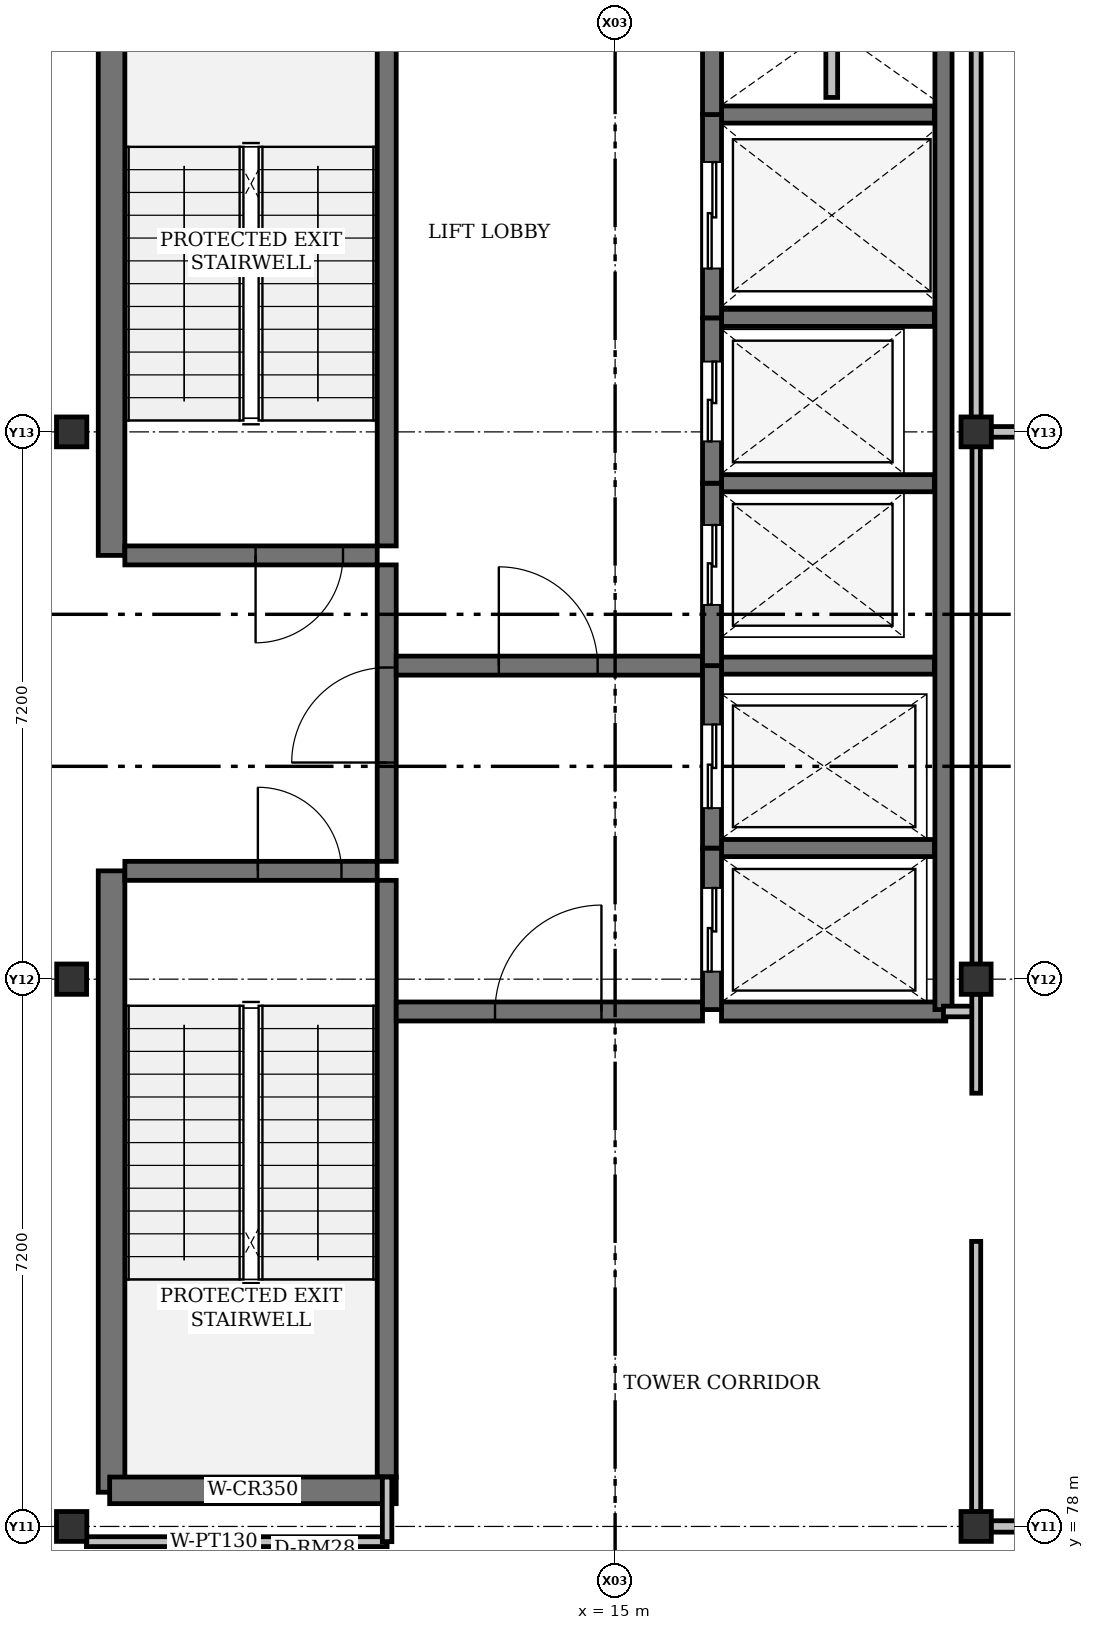
"""IFC4 building model, lengths in metres.
Left out: names, types, materials, properties, quantities, classifications, styles, units other than length and angle.
Written with IfcOpenShell. Run it as: python <this file> out.ifc"""

import sys

from ifc_helpers import new_model, si_unit, direction, frame, frame_2d, origin, origin_2d, place, context, subcontext, project, spatial, rectangle, i_section, extrude, element, fill, save


model = new_model("IFC4")
c1 = context("Model", 3, precision=1e-05, world=origin(), true_north=direction((0.0, 1.0)))
c2 = subcontext(c1, "Body", "Model", "MODEL_VIEW")
j1 = project(units=[si_unit("LENGTHUNIT", "METRE"), si_unit("PLANEANGLEUNIT", "RADIAN")], contexts=[c1])
p1 = place(None, origin())
s1 = spatial("IfcSite", under=j1, at=p1, CompositionType="ELEMENT")
p2 = place(p1, origin())
s2 = spatial("IfcBuilding", under=s1, at=p2, CompositionType="ELEMENT")
p3 = place(p2, frame((0.0, 0.0, 5.4)))
s3 = spatial("IfcBuildingStorey", under=s2, at=p3, CompositionType="ELEMENT", Elevation=5.4)
for number, where, z_axis, x_axis in (
    (1, (7.85, 78.0, 0.0), (0.0, 0.0, 1.0), (1.0, 0.0, 0.0)),
    (2, (19.75, 78.0, 0.0), (0.0, 0.0, 1.0), (1.0, 0.0, 0.0)),
    (3, (7.85, 85.2, 0.0), (0.0, 0.0, 1.0), (0.0, 1.0, 0.0)),
    (4, (19.75, 85.2, 0.0), (0.0, 0.0, 1.0), (0.0, 1.0, 0.0)),
    (5, (7.85, 92.4, 0.0), (0.0, 0.0, 1.0), (1.0, 0.0, 0.0)),
    (6, (19.75, 92.4, 0.0), (0.0, 0.0, 1.0), (1.0, 0.0, 0.0)),
):
    element("IfcColumn", number, at=place(p3, frame(where, z_axis=z_axis, x_axis=x_axis)), inside=s3, PredefinedType="COLUMN", context=c2, shape_type="SweptSolid", body=[
        extrude(i_section(OverallWidth=0.399, OverallDepth=0.393, WebThickness=0.023, FlangeThickness=0.036, FilletRadius=0.015, at=origin_2d()), origin(), (0.0, 0.0, 1.0), 4.5),
    ])
for number, where, z_axis, x_axis in (
    (7, (8.375, 78.45, 0.0), (0.0, 0.0, 1.0), (0.0, 1.0, 0.0)),
    (8, (8.375, 90.775, 0.0), (0.0, 0.0, 1.0), (0.0, 1.0, 0.0)),
):
    element("IfcWall", number, at=place(p3, frame(where, z_axis=z_axis, x_axis=x_axis)), inside=s3, PredefinedType="SHEAR", context=c2, shape_type="SweptSolid", body=[
        extrude(rectangle(XDim=8.175, YDim=0.35, at=frame_2d((4.087, 0.0))), origin(), (0.0, 0.0, 1.0), 4.5),
    ])
for number, where, z_axis, x_axis in (
    (9, (11.995, 78.65, 0.0), (0.0, 0.0, 1.0), (0.0, 1.0, 0.0)),
    (10, (11.995, 90.9, 0.0), (0.0, 0.0, 1.0), (0.0, 1.0, 0.0)),
):
    element("IfcWall", number, at=place(p3, frame(where, z_axis=z_axis, x_axis=x_axis)), inside=s3, PredefinedType="SHEAR", context=c2, shape_type="SweptSolid", body=[
        extrude(rectangle(XDim=7.85, YDim=0.25, at=frame_2d((3.925, 0.0))), origin(), (0.0, 0.0, 1.0), 4.5),
    ])
p4 = place(p3, frame((11.995, 86.75, 0.0), z_axis=(0.0, 0.0, 1.0), x_axis=(0.0, 1.0, 0.0)))
e11 = element("IfcWall", 11, at=p4, inside=s3, PredefinedType="SHEAR", context=c2, shape_type="SweptSolid", body=[
    extrude(rectangle(XDim=3.9, YDim=0.25, at=frame_2d((1.95, 0.0))), origin(), (0.0, 0.0, 1.0), 4.5),
])
p5 = place(p4, frame((1.3, 0.0, 0.0)))
e12 = element("IfcOpeningElement", 12, at=p5, cuts=e11, PredefinedType="OPENING", context=c2, shape_type="SweptSolid", body=[
    extrude(rectangle(XDim=1.25, YDim=2.2, at=frame_2d((0.625, 1.1))), frame((0.0, 0.125, 0.0), z_axis=(0.0, -1.0, 0.0), x_axis=(1.0, 0.0, 0.0)), (0.0, 0.0, 1.0), 0.25),
])
p6 = place(p3, frame((8.35, 78.475, 0.0), z_axis=(0.0, 0.0, 1.0), x_axis=(1.0, 0.0, 0.0)))
e13 = element("IfcWall", 13, at=p6, inside=s3, PredefinedType="SHEAR", context=c2, shape_type="SweptSolid", body=[
    extrude(rectangle(XDim=3.77, YDim=0.35, at=frame_2d((1.885, 0.0))), origin(), (0.0, 0.0, 1.0), 4.5),
])
p7 = place(p3, frame((8.55, 86.625, 0.0), z_axis=(0.0, 0.0, 1.0), x_axis=(1.0, 0.0, 0.0)))
e14 = element("IfcWall", 14, at=p7, inside=s3, PredefinedType="SHEAR", context=c2, shape_type="SweptSolid", body=[
    extrude(rectangle(XDim=3.32, YDim=0.25, at=frame_2d((1.66, 0.0))), origin(), (0.0, 0.0, 1.0), 4.5),
])
p8 = place(p7, frame((1.75, 0.0, 0.0)))
e15 = element("IfcOpeningElement", 15, at=p8, cuts=e14, PredefinedType="OPENING", context=c2, shape_type="SweptSolid", body=[
    extrude(rectangle(XDim=1.1, YDim=2.15, at=frame_2d((0.55, 1.075))), frame((0.0, 0.125, 0.0), z_axis=(0.0, -1.0, 0.0), x_axis=(1.0, 0.0, 0.0)), (0.0, 0.0, 1.0), 0.25),
])
p9 = place(p3, frame((11.87, 90.775, 0.0), z_axis=(0.0, 0.0, 1.0), x_axis=(-1.0, 0.0, 0.0)))
e16 = element("IfcWall", 16, at=p9, inside=s3, PredefinedType="SHEAR", context=c2, shape_type="SweptSolid", body=[
    extrude(rectangle(XDim=3.32, YDim=0.25, at=frame_2d((1.66, 0.0))), origin(), (0.0, 0.0, 1.0), 4.5),
])
p10 = place(p9, frame((0.45, 0.0, 0.0)))
e17 = element("IfcOpeningElement", 17, at=p10, cuts=e16, PredefinedType="OPENING", context=c2, shape_type="SweptSolid", body=[
    extrude(rectangle(XDim=1.15, YDim=2.15, at=frame_2d((0.575, 1.075))), frame((0.0, 0.125, 0.0), z_axis=(0.0, -1.0, 0.0), x_axis=(1.0, 0.0, 0.0)), (0.0, 0.0, 1.0), 0.25),
])
p11 = place(p3, frame((12.12, 89.325, 0.0), z_axis=(0.0, 0.0, 1.0), x_axis=(1.0, 0.0, 0.0)))
e18 = element("IfcWall", 18, at=p11, inside=s3, PredefinedType="SHEAR", context=c2, shape_type="SweptSolid", body=[
    extrude(rectangle(XDim=4.03, YDim=0.25, at=frame_2d((2.015, 0.0))), origin(), (0.0, 0.0, 1.0), 4.5),
])
p12 = place(p11, frame((1.35, 0.0, 0.0)))
e19 = element("IfcOpeningElement", 19, at=p12, cuts=e18, PredefinedType="OPENING", context=c2, shape_type="SweptSolid", body=[
    extrude(rectangle(XDim=1.3, YDim=2.2, at=frame_2d((0.65, 1.1))), frame((0.0, 0.125, 0.0), z_axis=(0.0, -1.0, 0.0), x_axis=(1.0, 0.0, 0.0)), (0.0, 0.0, 1.0), 0.25),
])
p13 = place(p3, frame((12.12, 84.775, 0.0), z_axis=(0.0, 0.0, 1.0), x_axis=(1.0, 0.0, 0.0)))
e20 = element("IfcWall", 20, at=p13, inside=s3, PredefinedType="SHEAR", context=c2, shape_type="SweptSolid", body=[
    extrude(rectangle(XDim=4.03, YDim=0.25, at=frame_2d((2.015, 0.0))), origin(), (0.0, 0.0, 1.0), 4.5),
])
p14 = place(p13, frame((1.3, 0.0, 0.0)))
e21 = element("IfcOpeningElement", 21, at=p14, cuts=e20, PredefinedType="OPENING", context=c2, shape_type="SweptSolid", body=[
    extrude(rectangle(XDim=1.4, YDim=2.25, at=frame_2d((0.7, 1.125))), frame((0.0, 0.125, 0.0), z_axis=(0.0, -1.0, 0.0), x_axis=(1.0, 0.0, 0.0)), (0.0, 0.0, 1.0), 0.25),
])
p15 = place(p3, frame((16.4, 84.775, 0.0), z_axis=(0.0, 0.0, 1.0), x_axis=(1.0, 0.0, 0.0)))
e22 = element("IfcWall", 22, at=p15, inside=s3, PredefinedType="SHEAR", context=c2, shape_type="SweptSolid", body=[
    extrude(rectangle(XDim=2.95, YDim=0.25, at=frame_2d((1.475, 0.0))), origin(), (0.0, 0.0, 1.0), 4.5),
])
p16 = place(p3, frame((19.32, 84.8, 0.0), z_axis=(0.0, 0.0, 1.0), x_axis=(0.0, 1.0, 0.0)))
e23 = element("IfcWall", 23, at=p16, inside=s3, PredefinedType="SHEAR", context=c2, shape_type="SweptSolid", body=[
    extrude(rectangle(XDim=13.95, YDim=0.225, at=frame_2d((6.975, 0.0))), origin(), (0.0, 0.0, 1.0), 4.5),
])
for number, where, z_axis, x_axis in (
    (24, (16.4, 86.925, 0.0), (0.0, 0.0, 1.0), (1.0, 0.0, 0.0)),
    (25, (16.4, 89.325, 0.0), (0.0, 0.0, 1.0), (1.0, 0.0, 0.0)),
    (26, (16.4, 91.725, 0.0), (0.0, 0.0, 1.0), (1.0, 0.0, 0.0)),
    (27, (16.4, 93.9, 0.0), (0.0, 0.0, 1.0), (1.0, 0.0, 0.0)),
    (28, (16.4, 96.575, 0.0), (0.0, 0.0, 1.0), (1.0, 0.0, 0.0)),
):
    element("IfcWall", number, at=place(p3, frame(where, z_axis=z_axis, x_axis=x_axis)), inside=s3, PredefinedType="SHEAR", context=c2, shape_type="SweptSolid", body=[
        extrude(rectangle(XDim=2.8, YDim=0.225, at=frame_2d((1.4, 0.0))), origin(), (0.0, 0.0, 1.0), 4.5),
    ])
p17 = place(p3, frame((16.275, 84.8, 0.0), z_axis=(0.0, 0.0, 1.0), x_axis=(0.0, 1.0, 0.0)))
e29 = element("IfcWall", 29, at=p17, inside=s3, PredefinedType="SHEAR", context=c2, shape_type="SweptSolid", body=[
    extrude(rectangle(XDim=2.125, YDim=0.25, at=frame_2d((1.062, 0.0))), origin(), (0.0, 0.0, 1.0), 4.5),
])
p18 = place(p17, frame((0.5, 0.0, 0.0)))
e30 = element("IfcOpeningElement", 30, at=p18, cuts=e29, PredefinedType="OPENING", context=c2, shape_type="SweptSolid", body=[
    extrude(rectangle(XDim=1.1, YDim=2.15, at=frame_2d((0.55, 1.075))), frame((0.0, 0.125, 0.0), z_axis=(0.0, -1.0, 0.0), x_axis=(1.0, 0.0, 0.0)), (0.0, 0.0, 1.0), 0.25),
])
p19 = place(p3, frame((16.275, 86.925, 0.0), z_axis=(0.0, 0.0, 1.0), x_axis=(0.0, 1.0, 0.0)))
e31 = element("IfcWall", 31, at=p19, inside=s3, PredefinedType="SHEAR", context=c2, shape_type="SweptSolid", body=[
    extrude(rectangle(XDim=2.4, YDim=0.25, at=frame_2d((1.2, 0.0))), origin(), (0.0, 0.0, 1.0), 4.5),
])
p20 = place(p19, frame((0.525, 0.0, 0.0)))
e32 = element("IfcOpeningElement", 32, at=p20, cuts=e31, PredefinedType="OPENING", context=c2, shape_type="SweptSolid", body=[
    extrude(rectangle(XDim=1.1, YDim=2.15, at=frame_2d((0.55, 1.075))), frame((0.0, 0.125, 0.0), z_axis=(0.0, -1.0, 0.0), x_axis=(1.0, 0.0, 0.0)), (0.0, 0.0, 1.0), 0.25),
])
p21 = place(p3, frame((16.275, 89.325, 0.0), z_axis=(0.0, 0.0, 1.0), x_axis=(0.0, 1.0, 0.0)))
e33 = element("IfcWall", 33, at=p21, inside=s3, PredefinedType="SHEAR", context=c2, shape_type="SweptSolid", body=[
    extrude(rectangle(XDim=2.4, YDim=0.25, at=frame_2d((1.2, 0.0))), origin(), (0.0, 0.0, 1.0), 4.5),
])
p22 = place(p21, frame((0.8, 0.0, 0.0)))
e34 = element("IfcOpeningElement", 34, at=p22, cuts=e33, PredefinedType="OPENING", context=c2, shape_type="SweptSolid", body=[
    extrude(rectangle(XDim=1.05, YDim=2.15, at=frame_2d((0.525, 1.075))), frame((0.0, 0.125, 0.0), z_axis=(0.0, -1.0, 0.0), x_axis=(1.0, 0.0, 0.0)), (0.0, 0.0, 1.0), 0.25),
])
p23 = place(p3, frame((16.275, 91.725, 0.0), z_axis=(0.0, 0.0, 1.0), x_axis=(0.0, 1.0, 0.0)))
e35 = element("IfcWall", 35, at=p23, inside=s3, PredefinedType="SHEAR", context=c2, shape_type="SweptSolid", body=[
    extrude(rectangle(XDim=2.175, YDim=0.25, at=frame_2d((1.087, 0.0))), origin(), (0.0, 0.0, 1.0), 4.5),
])
p24 = place(p23, frame((0.55, 0.0, 0.0)))
e36 = element("IfcOpeningElement", 36, at=p24, cuts=e35, PredefinedType="OPENING", context=c2, shape_type="SweptSolid", body=[
    extrude(rectangle(XDim=1.05, YDim=2.15, at=frame_2d((0.525, 1.075))), frame((0.0, 0.125, 0.0), z_axis=(0.0, -1.0, 0.0), x_axis=(1.0, 0.0, 0.0)), (0.0, 0.0, 1.0), 0.25),
])
p25 = place(p3, frame((16.275, 93.9, 0.0), z_axis=(0.0, 0.0, 1.0), x_axis=(0.0, 1.0, 0.0)))
e37 = element("IfcWall", 37, at=p25, inside=s3, PredefinedType="SHEAR", context=c2, shape_type="SweptSolid", body=[
    extrude(rectangle(XDim=2.675, YDim=0.25, at=frame_2d((1.337, 0.0))), origin(), (0.0, 0.0, 1.0), 4.5),
])
p26 = place(p25, frame((0.65, 0.0, 0.0)))
e38 = element("IfcOpeningElement", 38, at=p26, cuts=e37, PredefinedType="OPENING", context=c2, shape_type="SweptSolid", body=[
    extrude(rectangle(XDim=1.4, YDim=2.25, at=frame_2d((0.7, 1.125))), frame((0.0, 0.125, 0.0), z_axis=(0.0, -1.0, 0.0), x_axis=(1.0, 0.0, 0.0)), (0.0, 0.0, 1.0), 0.25),
])
p27 = place(p3, frame((16.275, 96.575, 0.0), z_axis=(0.0, 0.0, 1.0), x_axis=(0.0, 1.0, 0.0)))
e39 = element("IfcWall", 39, at=p27, inside=s3, PredefinedType="SHEAR", context=c2, shape_type="SweptSolid", body=[
    extrude(rectangle(XDim=2.175, YDim=0.25, at=frame_2d((1.087, 0.0))), origin(), (0.0, 0.0, 1.0), 4.5),
])
p28 = place(p3, frame((17.85, 96.8, 0.0), z_axis=(0.0, 0.0, 1.0), x_axis=(0.0, 1.0, 0.0)))
e40 = element("IfcWall", 40, at=p28, inside=s3, PredefinedType="PLUMBINGWALL", context=c2, shape_type="SweptSolid", body=[
    extrude(rectangle(XDim=1.8, YDim=0.155, at=frame_2d((0.9, 0.0))), origin(), (0.0, 0.0, 1.0), 4.5),
])
p29 = place(p3, frame((19.32, 84.775, 0.0), z_axis=(0.0, 0.0, 1.0), x_axis=(1.0, 0.0, 0.0)))
e41 = element("IfcWall", 41, at=p29, inside=s3, PredefinedType="PARTITIONING", context=c2, shape_type="SweptSolid", body=[
    extrude(rectangle(XDim=0.43, YDim=0.14, at=frame_2d((0.215, 0.0))), origin(), (0.0, 0.0, 1.0), 3.797),
])
p30 = place(p3, frame((8.044, 77.8, 0.0), z_axis=(0.0, 0.0, 1.0), x_axis=(1.0, 0.0, 0.0)))
e42 = element("IfcWall", 42, at=p30, inside=s3, PredefinedType="PARTITIONING", context=c2, shape_type="SweptSolid", body=[
    extrude(rectangle(XDim=3.956, YDim=0.13, at=frame_2d((1.978, 0.0))), origin(), (0.0, 0.0, 1.0), 3.721),
])
p31 = place(p3, frame((12.0, 77.8, 0.0), z_axis=(0.0, 0.0, 1.0), x_axis=(0.0, 1.0, 0.0)))
e43 = element("IfcWall", 43, at=p31, inside=s3, PredefinedType="PARTITIONING", context=c2, shape_type="SweptSolid", body=[
    extrude(rectangle(XDim=0.85, YDim=0.125, at=frame_2d((0.425, 0.0))), origin(), (0.0, 0.0, 1.0), 3.721),
])
p32 = place(p3, frame((19.945, 92.4, 0.0), z_axis=(0.0, 0.0, 1.0), x_axis=(1.0, 0.0, 0.0)))
e44 = element("IfcWall", 44, at=p32, inside=s3, PredefinedType="PARTITIONING", context=c2, shape_type="SweptSolid", body=[
    extrude(rectangle(XDim=9.411, YDim=0.14, at=frame_2d((4.706, 0.0))), origin(), (0.0, 0.0, 1.0), 3.721),
])
p33 = place(p32, frame((1.496, 0.0, 0.0)))
e45 = element("IfcOpeningElement", 45, at=p33, cuts=e44, PredefinedType="OPENING", context=c2, shape_type="SweptSolid", body=[
    extrude(rectangle(XDim=1.42, YDim=2.3, at=frame_2d((0.71, 1.15))), frame((0.0, 0.07, 0.0), z_axis=(0.0, -1.0, 0.0), x_axis=(1.0, 0.0, 0.0)), (0.0, 0.0, 1.0), 0.14),
])
p34 = place(p3, frame((19.75, 99.406, 0.0), z_axis=(0.0, 0.0, 1.0), x_axis=(0.0, -1.0, 0.0)))
e46 = element("IfcWall", 46, at=p34, inside=s3, PredefinedType="PARTITIONING", context=c2, shape_type="SweptSolid", body=[
    extrude(rectangle(XDim=6.814, YDim=0.13, at=frame_2d((3.407, 0.0))), origin(), (0.0, 0.0, 1.0), 3.797),
])
p35 = place(p3, frame((19.75, 78.191, 0.0), z_axis=(0.0, 0.0, 1.0), x_axis=(0.0, 1.0, 0.0)))
e47 = element("IfcWall", 47, at=p35, inside=s3, PredefinedType="PARTITIONING", context=c2, shape_type="SweptSolid", body=[
    extrude(rectangle(XDim=3.559, YDim=0.12, at=frame_2d((1.779, 0.0))), origin(), (0.0, 0.0, 1.0), 3.797),
])
p36 = place(p3, frame((19.75, 83.7, 0.0), z_axis=(0.0, 0.0, 1.0), x_axis=(0.0, 1.0, 0.0)))
e48 = element("IfcWall", 48, at=p36, inside=s3, PredefinedType="PARTITIONING", context=c2, shape_type="SweptSolid", body=[
    extrude(rectangle(XDim=1.306, YDim=0.115, at=frame_2d((0.653, 0.0))), origin(), (0.0, 0.0, 1.0), 3.797),
])
p37 = place(p3, frame((19.75, 85.395, 0.0), z_axis=(0.0, 0.0, 1.0), x_axis=(0.0, 1.0, 0.0)))
e49 = element("IfcWall", 49, at=p37, inside=s3, PredefinedType="PARTITIONING", context=c2, shape_type="SweptSolid", body=[
    extrude(rectangle(XDim=6.814, YDim=0.11, at=frame_2d((3.407, 0.0))), origin(), (0.0, 0.0, 1.0), 3.797),
])
p38 = place(p3, frame((29.105, 78.0, 0.0), z_axis=(0.0, 0.0, 1.0), x_axis=(-1.0, 0.0, 0.0)))
e50 = element("IfcWall", 50, at=p38, inside=s3, PredefinedType="PARTITIONING", context=c2, shape_type="SweptSolid", body=[
    extrude(rectangle(XDim=9.161, YDim=0.15, at=frame_2d((4.581, 0.0))), origin(), (0.0, 0.0, 1.0), 3.721),
])
p39 = place(p5, origin())
e51 = element("IfcDoor", 51, at=p39, inside=s3, OperationType="SINGLE_SWING_LEFT", PredefinedType="DOOR", context=c2, shape_type="SweptSolid", body=[
    extrude(rectangle(XDim=1.25, YDim=2.2, at=frame_2d((0.625, 1.1))), frame((0.0, 0.025, 0.0), z_axis=(0.0, -1.0, 0.0), x_axis=(1.0, 0.0, 0.0)), (0.0, 0.0, 1.0), 0.05),
])
fill(e12, e51)
p40 = place(p8, origin())
e52 = element("IfcDoor", 52, at=p40, inside=s3, OperationType="SINGLE_SWING_LEFT", PredefinedType="DOOR", context=c2, shape_type="SweptSolid", body=[
    extrude(rectangle(XDim=1.1, YDim=2.15, at=frame_2d((0.55, 1.075))), frame((0.0, 0.025, 0.0), z_axis=(0.0, -1.0, 0.0), x_axis=(1.0, 0.0, 0.0)), (0.0, 0.0, 1.0), 0.05),
])
fill(e15, e52)
p41 = place(p10, origin())
e53 = element("IfcDoor", 53, at=p41, inside=s3, OperationType="SINGLE_SWING_RIGHT", PredefinedType="DOOR", context=c2, shape_type="SweptSolid", body=[
    extrude(rectangle(XDim=1.15, YDim=2.15, at=frame_2d((0.575, 1.075))), frame((0.0, 0.025, 0.0), z_axis=(0.0, -1.0, 0.0), x_axis=(1.0, 0.0, 0.0)), (0.0, 0.0, 1.0), 0.05),
])
fill(e17, e53)
p42 = place(p12, origin())
e54 = element("IfcDoor", 54, at=p42, inside=s3, OperationType="SINGLE_SWING_LEFT", PredefinedType="DOOR", context=c2, shape_type="SweptSolid", body=[
    extrude(rectangle(XDim=1.3, YDim=2.2, at=frame_2d((0.65, 1.1))), frame((0.0, 0.025, 0.0), z_axis=(0.0, -1.0, 0.0), x_axis=(1.0, 0.0, 0.0)), (0.0, 0.0, 1.0), 0.05),
])
fill(e19, e54)
p43 = place(p14, origin())
e55 = element("IfcDoor", 55, at=p43, inside=s3, OperationType="SINGLE_SWING_RIGHT", PredefinedType="DOOR", context=c2, shape_type="SweptSolid", body=[
    extrude(rectangle(XDim=1.4, YDim=2.25, at=frame_2d((0.7, 1.125))), frame((0.0, 0.025, 0.0), z_axis=(0.0, -1.0, 0.0), x_axis=(1.0, 0.0, 0.0)), (0.0, 0.0, 1.0), 0.05),
])
fill(e21, e55)
p44 = place(p18, origin())
e56 = element("IfcDoor", 56, at=p44, inside=s3, OperationType="SLIDING_TO_LEFT", PredefinedType="DOOR", context=c2, shape_type="SweptSolid", body=[
    extrude(rectangle(XDim=1.1, YDim=2.15, at=frame_2d((0.55, 1.075))), frame((0.0, 0.025, 0.0), z_axis=(0.0, -1.0, 0.0), x_axis=(1.0, 0.0, 0.0)), (0.0, 0.0, 1.0), 0.05),
])
fill(e30, e56)
p45 = place(p20, origin())
e57 = element("IfcDoor", 57, at=p45, inside=s3, OperationType="SLIDING_TO_LEFT", PredefinedType="DOOR", context=c2, shape_type="SweptSolid", body=[
    extrude(rectangle(XDim=1.1, YDim=2.15, at=frame_2d((0.55, 1.075))), frame((0.0, 0.025, 0.0), z_axis=(0.0, -1.0, 0.0), x_axis=(1.0, 0.0, 0.0)), (0.0, 0.0, 1.0), 0.05),
])
fill(e32, e57)
p46 = place(p22, origin())
e58 = element("IfcDoor", 58, at=p46, inside=s3, OperationType="SLIDING_TO_LEFT", PredefinedType="DOOR", context=c2, shape_type="SweptSolid", body=[
    extrude(rectangle(XDim=1.05, YDim=2.15, at=frame_2d((0.525, 1.075))), frame((0.0, 0.025, 0.0), z_axis=(0.0, -1.0, 0.0), x_axis=(1.0, 0.0, 0.0)), (0.0, 0.0, 1.0), 0.05),
])
fill(e34, e58)
p47 = place(p24, origin())
e59 = element("IfcDoor", 59, at=p47, inside=s3, OperationType="SLIDING_TO_LEFT", PredefinedType="DOOR", context=c2, shape_type="SweptSolid", body=[
    extrude(rectangle(XDim=1.05, YDim=2.15, at=frame_2d((0.525, 1.075))), frame((0.0, 0.025, 0.0), z_axis=(0.0, -1.0, 0.0), x_axis=(1.0, 0.0, 0.0)), (0.0, 0.0, 1.0), 0.05),
])
fill(e36, e59)
p48 = place(p26, origin())
e60 = element("IfcDoor", 60, at=p48, inside=s3, OperationType="SLIDING_TO_LEFT", PredefinedType="DOOR", context=c2, shape_type="SweptSolid", body=[
    extrude(rectangle(XDim=1.4, YDim=2.25, at=frame_2d((0.7, 1.125))), frame((0.0, 0.025, 0.0), z_axis=(0.0, -1.0, 0.0), x_axis=(1.0, 0.0, 0.0)), (0.0, 0.0, 1.0), 0.05),
])
fill(e38, e60)
save(model, sys.argv[1])
